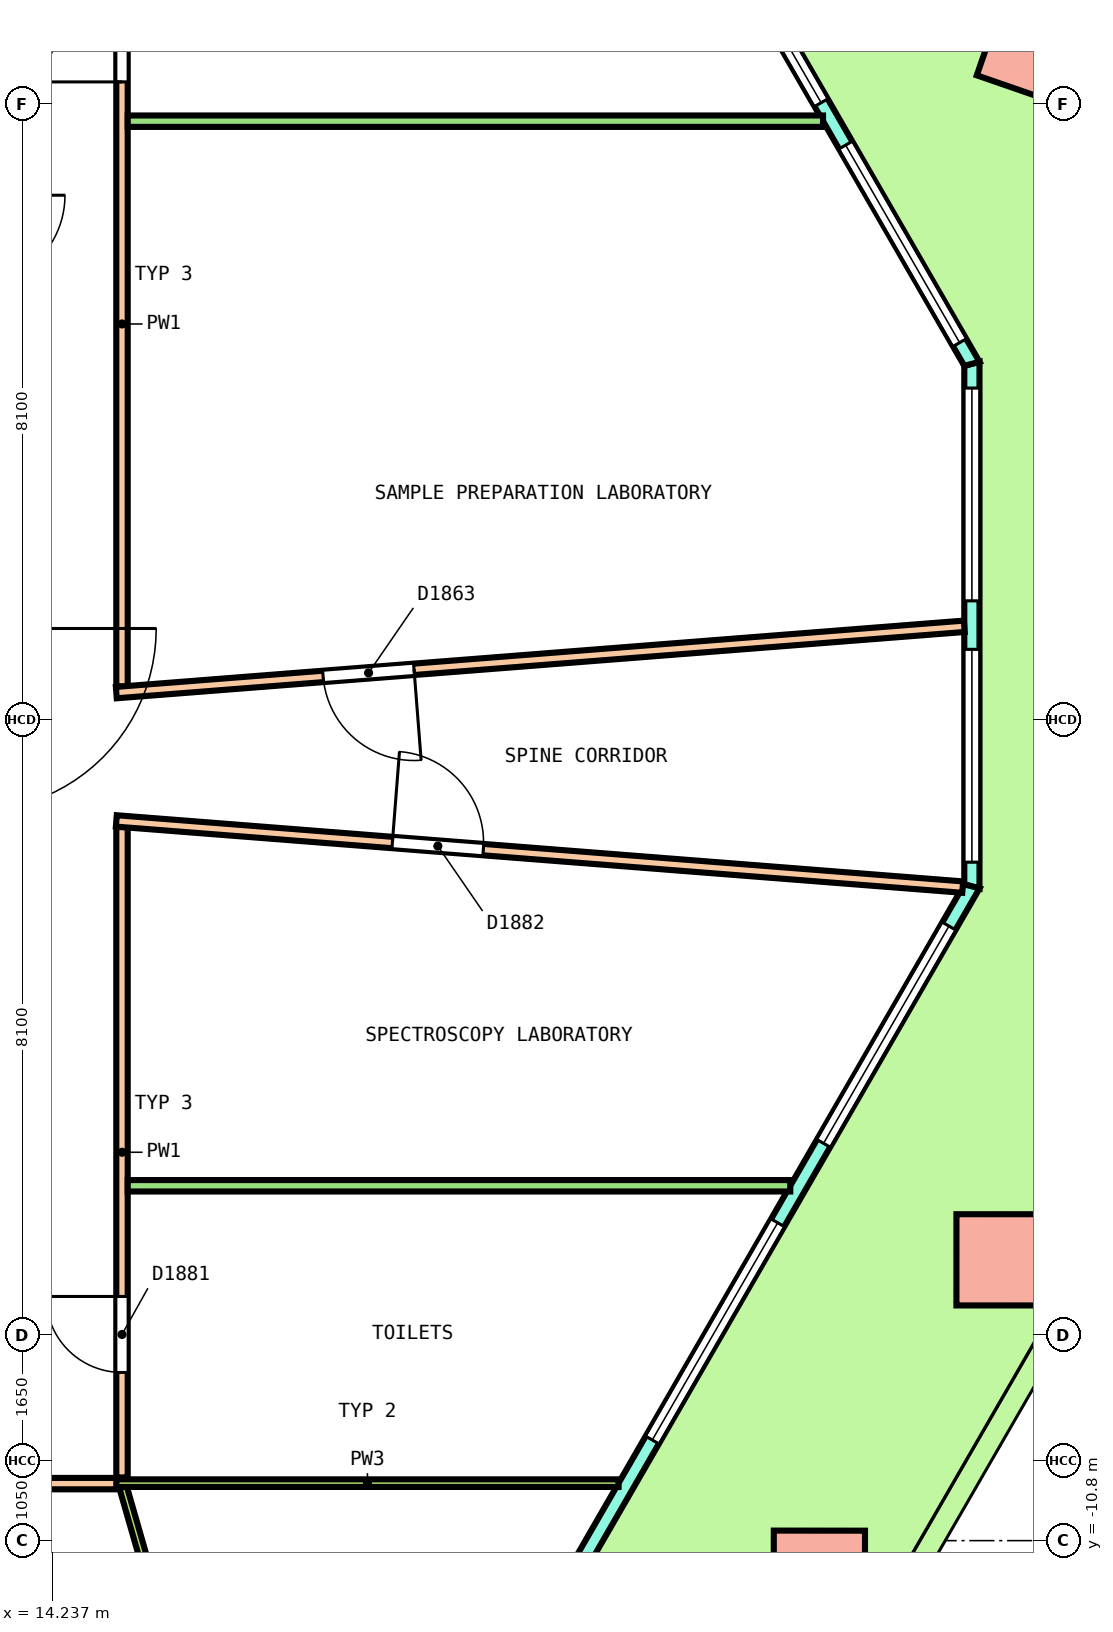
"""IFC4 building model, lengths in metres.
Left out: names, types, materials, properties, quantities, classifications, styles, units other than length and angle.
Written with IfcOpenShell. Run it as: python <this file> out.ifc"""

import sys

from ifc_helpers import new_model, si_unit, direction, frame, frame_2d, origin, origin_2d, place, context, subcontext, project, spatial, polyline, rectangle, outline, extrude, element, fill, save


model = new_model("IFC4")
c1 = context("Model", 3, precision=1e-05, world=origin(), true_north=direction((0.0, 1.0)))
c2 = subcontext(c1, "Body", "Model", "MODEL_VIEW")
j1 = project(units=[si_unit("LENGTHUNIT", "METRE"), si_unit("PLANEANGLEUNIT", "RADIAN")], contexts=[c1])
p1 = place(None, origin())
s1 = spatial("IfcSite", under=j1, at=p1, CompositionType="ELEMENT")
p2 = place(p1, origin())
s2 = spatial("IfcBuilding", under=s1, at=p2, CompositionType="ELEMENT")
p3 = place(p2, frame((0.0, 0.0, 184.8)))
s3 = spatial("IfcBuildingStorey", under=s2, at=p3, CompositionType="ELEMENT", Elevation=184.8)
p4 = place(p3, frame((27.159, 8.848, 0.0), z_axis=(0.021809609218, 0.025123223878, 0.999446429063), x_axis=(-0.499316957517, 0.86635106376, -0.010881647777)))
e1 = element("IfcColumn", 1, at=p4, inside=s3, PredefinedType="COLUMN", context=c2, shape_type="SweptSolid", body=[
    extrude(rectangle(XDim=1.2, YDim=1.2, at=origin_2d()), origin(), (0.0, 0.0, 1.0), 4.052),
])
p5 = place(p3, frame((24.325, -11.269, 0.0), z_axis=(0.003556481251, 0.006269051696, 0.999974024879), x_axis=(0.494245814029, 0.869292313203, -0.00720760164)))
e2 = element("IfcColumn", 2, at=p5, inside=s3, PredefinedType="COLUMN", context=c2, shape_type="SweptSolid", body=[
    extrude(rectangle(XDim=1.2, YDim=1.2, at=origin_2d()), origin(), (0.0, 0.0, 1.0), 4.05),
])
p6 = place(p3, frame((26.728, -7.106, 0.0), z_axis=(0.010908253887, 0.018863444567, 0.99976256204), x_axis=(0.500638377412, 0.865382225109, -0.021790354016)))
e3 = element("IfcColumn", 3, at=p6, inside=s3, PredefinedType="COLUMN", context=c2, shape_type="SweptSolid", body=[
    extrude(rectangle(XDim=1.2, YDim=1.2, at=origin_2d()), origin(), (0.0, 0.0, 1.0), 4.051),
])
p7 = place(p3, frame((26.331, -2.193, 0.0), z_axis=(0.0, 0.0, 1.0), x_axis=(0.0, 1.0, 0.0)))
e4 = element("IfcWall", 4, at=p7, inside=s3, PredefinedType="SOLIDWALL", context=c2, shape_type="SweptSolid", body=[
    extrude(outline(polyline([(-0.027, -0.1), (1.128, -0.1), (2.283, -0.1), (3.438, -0.1), (4.592, -0.1), (5.747, -0.1), (6.902, -0.1), (6.848, 0.1), (5.711, 0.1), (4.574, 0.1), (3.438, 0.1), (2.301, 0.1), (1.164, 0.1), (0.027, 0.1), (-0.027, -0.1)])), origin(), (0.0, 0.0, 1.0), 4.1),
])
p8 = place(p7, frame((0.319, 0.0, 0.1)))
e5 = element("IfcOpeningElement", 5, at=p8, cuts=e4, PredefinedType="OPENING", context=c2, shape_type="SweptSolid", body=[
    extrude(rectangle(XDim=2.8, YDim=2.9, at=frame_2d((1.4, 1.45))), frame((0.0, 0.11, 0.0), z_axis=(0.0, -1.0, 0.0), x_axis=(1.0, 0.0, 0.0)), (0.0, 0.0, 1.0), 0.22),
])
p9 = place(p7, frame((3.756, 0.0, 0.1)))
e6 = element("IfcOpeningElement", 6, at=p9, cuts=e4, PredefinedType="OPENING", context=c2, shape_type="SweptSolid", body=[
    extrude(rectangle(XDim=2.8, YDim=2.9, at=frame_2d((1.4, 1.45))), frame((0.0, 0.11, 0.0), z_axis=(0.0, -1.0, 0.0), x_axis=(1.0, 0.0, 0.0)), (0.0, 0.0, 1.0), 0.22),
])
p10 = place(p3, frame((26.331, 4.682, 0.0), z_axis=(0.0, 0.0, 1.0), x_axis=(-0.500002344326, 0.866024050283, 0.0)))
e7 = element("IfcWall", 7, at=p10, inside=s3, PredefinedType="SOLIDWALL", context=c2, shape_type="SweptSolid", body=[
    extrude(outline(polyline([(-0.027, -0.1), (0.989, -0.1), (2.004, -0.1), (3.019, -0.1), (4.034, -0.1), (5.05, -0.1), (6.065, -0.1), (7.08, -0.1), (8.096, -0.1), (9.111, -0.1), (10.126, -0.1), (11.142, -0.1), (12.157, -0.1), (13.172, -0.1), (14.188, -0.1), (15.203, -0.1), (16.218, -0.1), (17.234, -0.1), (18.249, -0.1), (18.195, 0.1), (17.186, 0.1), (16.177, 0.1), (15.167, 0.1), (14.158, 0.1), (13.148, 0.1), (12.139, 0.1), (11.13, 0.1), (10.12, 0.1), (9.111, 0.1), (8.102, 0.1), (7.092, 0.1), (6.083, 0.1), (5.074, 0.1), (4.064, 0.1), (3.055, 0.1), (2.046, 0.1), (1.036, 0.1), (0.027, 0.1), (-0.027, -0.1)])), origin(), (0.0, 0.0, 1.0), 4.1),
])
p11 = place(p10, frame((0.322, 0.0, 0.1)))
e8 = element("IfcOpeningElement", 8, at=p11, cuts=e7, PredefinedType="OPENING", context=c2, shape_type="SweptSolid", body=[
    extrude(rectangle(XDim=3.0, YDim=2.9, at=frame_2d((1.5, 1.45))), frame((0.0, 0.11, 0.0), z_axis=(0.0, -1.0, 0.0), x_axis=(1.0, 0.0, 0.0)), (0.0, 0.0, 1.0), 0.22),
])
p12 = place(p10, frame((3.967, 0.0, 0.1)))
e9 = element("IfcOpeningElement", 9, at=p12, cuts=e7, PredefinedType="OPENING", context=c2, shape_type="SweptSolid", body=[
    extrude(rectangle(XDim=3.0, YDim=2.9, at=frame_2d((1.5, 1.45))), frame((0.0, 0.11, 0.0), z_axis=(0.0, -1.0, 0.0), x_axis=(1.0, 0.0, 0.0)), (0.0, 0.0, 1.0), 0.22),
])
p13 = place(p10, frame((8.211, 0.0, 0.0)))
e10 = element("IfcOpeningElement", 10, at=p13, cuts=e7, PredefinedType="OPENING", context=c2, shape_type="SweptSolid", body=[
    extrude(rectangle(XDim=1.8, YDim=2.4, at=frame_2d((0.9, 1.2))), frame((0.0, 0.11, 0.0), z_axis=(0.0, -1.0, 0.0), x_axis=(1.0, 0.0, 0.0)), (0.0, 0.0, 1.0), 0.22),
])
p14 = place(p10, frame((8.211, 0.0, 2.55)))
e11 = element("IfcOpeningElement", 11, at=p14, cuts=e7, PredefinedType="OPENING", context=c2, shape_type="SweptSolid", body=[
    extrude(rectangle(XDim=1.8, YDim=0.45, at=frame_2d((0.9, 0.225))), frame((0.0, 0.11, 0.0), z_axis=(0.0, -1.0, 0.0), x_axis=(1.0, 0.0, 0.0)), (0.0, 0.0, 1.0), 0.22),
])
p15 = place(p10, frame((11.256, 0.0, 0.1)))
e12 = element("IfcOpeningElement", 12, at=p15, cuts=e7, PredefinedType="OPENING", context=c2, shape_type="SweptSolid", body=[
    extrude(rectangle(XDim=3.0, YDim=2.9, at=frame_2d((1.5, 1.45))), frame((0.0, 0.11, 0.0), z_axis=(0.0, -1.0, 0.0), x_axis=(1.0, 0.0, 0.0)), (0.0, 0.0, 1.0), 0.22),
])
p16 = place(p10, frame((14.9, 0.0, 0.1)))
e13 = element("IfcOpeningElement", 13, at=p16, cuts=e7, PredefinedType="OPENING", context=c2, shape_type="SweptSolid", body=[
    extrude(rectangle(XDim=3.0, YDim=2.9, at=frame_2d((1.5, 1.45))), frame((0.0, 0.11, 0.0), z_axis=(0.0, -1.0, 0.0), x_axis=(1.0, 0.0, 0.0)), (0.0, 0.0, 1.0), 0.22),
])
p17 = place(p3, frame((15.065, -21.707, 0.0), z_axis=(0.0, 0.0, 1.0), x_axis=(0.499998501835, 0.866026268748, 0.0)))
e14 = element("IfcWall", 14, at=p17, inside=s3, PredefinedType="SOLIDWALL", context=c2, shape_type="SweptSolid", body=[
    extrude(outline(polyline([(-0.027, -0.1), (1.0, -0.1), (2.027, -0.1), (3.053, -0.1), (4.08, -0.1), (5.106, -0.1), (6.133, -0.1), (7.16, -0.1), (8.187, -0.1), (9.213, -0.1), (10.24, -0.1), (11.267, -0.1), (12.293, -0.1), (13.32, -0.1), (14.347, -0.1), (15.373, -0.1), (16.4, -0.1), (17.427, -0.1), (18.453, -0.1), (19.48, -0.1), (20.507, -0.1), (21.533, -0.1), (22.56, -0.1), (22.506, 0.1), (21.485, 0.1), (20.463, 0.1), (19.441, 0.1), (18.419, 0.1), (17.397, 0.1), (16.375, 0.1), (15.354, 0.1), (14.332, 0.1), (13.31, 0.1), (12.288, 0.1), (11.267, 0.1), (10.245, 0.1), (9.223, 0.1), (8.201, 0.1), (7.179, 0.1), (6.158, 0.1), (5.136, 0.1), (4.114, 0.1), (3.092, 0.1), (2.071, 0.1), (1.049, 0.1), (0.027, 0.1), (-0.027, -0.1)])), origin(), (0.0, 0.0, 1.0), 4.1),
])
p18 = place(p17, frame((0.603, 0.0, 0.1)))
e15 = element("IfcOpeningElement", 15, at=p18, cuts=e14, PredefinedType="OPENING", context=c2, shape_type="SweptSolid", body=[
    extrude(rectangle(XDim=3.3, YDim=2.9, at=frame_2d((1.65, 1.45))), frame((0.0, 0.11, 0.0), z_axis=(0.0, -1.0, 0.0), x_axis=(1.0, 0.0, 0.0)), (0.0, 0.0, 1.0), 0.22),
])
p19 = place(p17, frame((5.11, 0.0, 0.1)))
e16 = element("IfcOpeningElement", 16, at=p19, cuts=e14, PredefinedType="OPENING", context=c2, shape_type="SweptSolid", body=[
    extrude(rectangle(XDim=3.3, YDim=2.9, at=frame_2d((1.65, 1.45))), frame((0.0, 0.11, 0.0), z_axis=(0.0, -1.0, 0.0), x_axis=(1.0, 0.0, 0.0)), (0.0, 0.0, 1.0), 0.22),
])
p20 = place(p17, frame((10.367, 0.0, 0.0)))
e17 = element("IfcOpeningElement", 17, at=p20, cuts=e14, PredefinedType="OPENING", context=c2, shape_type="SweptSolid", body=[
    extrude(rectangle(XDim=1.8, YDim=2.4, at=frame_2d((0.9, 1.2))), frame((0.0, 0.11, 0.0), z_axis=(0.0, -1.0, 0.0), x_axis=(1.0, 0.0, 0.0)), (0.0, 0.0, 1.0), 0.22),
])
p21 = place(p17, frame((10.367, 0.0, 2.55)))
e18 = element("IfcOpeningElement", 18, at=p21, cuts=e14, PredefinedType="OPENING", context=c2, shape_type="SweptSolid", body=[
    extrude(rectangle(XDim=1.8, YDim=0.45, at=frame_2d((0.9, 0.225))), frame((0.0, 0.11, 0.0), z_axis=(0.0, -1.0, 0.0), x_axis=(1.0, 0.0, 0.0)), (0.0, 0.0, 1.0), 0.22),
])
p22 = place(p17, frame((14.123, 0.0, 0.1)))
e19 = element("IfcOpeningElement", 19, at=p22, cuts=e14, PredefinedType="OPENING", context=c2, shape_type="SweptSolid", body=[
    extrude(rectangle(XDim=3.3, YDim=2.9, at=frame_2d((1.65, 1.45))), frame((0.0, 0.11, 0.0), z_axis=(0.0, -1.0, 0.0), x_axis=(1.0, 0.0, 0.0)), (0.0, 0.0, 1.0), 0.22),
])
p23 = place(p17, frame((18.63, 0.0, 0.1)))
e20 = element("IfcOpeningElement", 20, at=p23, cuts=e14, PredefinedType="OPENING", context=c2, shape_type="SweptSolid", body=[
    extrude(rectangle(XDim=3.3, YDim=2.9, at=frame_2d((1.65, 1.45))), frame((0.0, 0.11, 0.0), z_axis=(0.0, -1.0, 0.0), x_axis=(1.0, 0.0, 0.0)), (0.0, 0.0, 1.0), 0.22),
])
p24 = place(p3, frame((15.15, -9.969, 0.0), z_axis=(0.0, 0.0, 1.0), x_axis=(0.0, 1.0, 0.0)))
e21 = element("IfcWall", 21, at=p24, inside=s3, PredefinedType="PARTITIONING", context=c2, shape_type="SweptSolid", body=[
    extrude(rectangle(XDim=8.556, YDim=0.15, at=frame_2d((4.278, 0.0))), origin(), (0.0, 0.0, 1.0), 3.05),
])
p25 = place(p24, frame((1.381, 0.0, 0.0)))
e22 = element("IfcOpeningElement", 22, at=p25, cuts=e21, PredefinedType="OPENING", context=c2, shape_type="SweptSolid", body=[
    extrude(rectangle(XDim=1.0, YDim=2.1, at=frame_2d((0.5, 1.05))), frame((0.0, 0.085, 0.0), z_axis=(0.0, -1.0, 0.0), x_axis=(1.0, 0.0, 0.0)), (0.0, 0.0, 1.0), 0.17),
])
p26 = place(p3, frame((15.15, 0.438, 0.0), z_axis=(0.0, 0.0, 1.0), x_axis=(0.0, 1.0, 0.0)))
e23 = element("IfcWall", 23, at=p26, inside=s3, PredefinedType="PARTITIONING", context=c2, shape_type="SweptSolid", body=[
    extrude(rectangle(XDim=9.538, YDim=0.15, at=frame_2d((4.769, 0.0))), origin(), (0.0, 0.0, 1.0), 3.05),
])
p27 = place(p26, frame((7.953, 0.0, 0.0)))
e24 = element("IfcOpeningElement", 24, at=p27, cuts=e23, PredefinedType="OPENING", context=c2, shape_type="SweptSolid", body=[
    extrude(rectangle(XDim=1.0, YDim=2.1, at=frame_2d((0.5, 1.05))), frame((0.0, 0.085, 0.0), z_axis=(0.0, -1.0, 0.0), x_axis=(1.0, 0.0, 0.0)), (0.0, 0.0, 1.0), 0.17),
])
p28 = place(p3, frame((-15.063, -10.05, 0.0), z_axis=(0.0, 0.0, 1.0), x_axis=(1.0, 0.0, 0.0)))
e25 = element("IfcWall", 25, at=p28, inside=s3, PredefinedType="PARTITIONING", context=c2, shape_type="SweptSolid", body=[
    extrude(rectangle(XDim=30.163, YDim=0.15, at=frame_2d((15.082, 0.0))), origin(), (0.0, 0.0, 1.0), 3.05),
])
p29 = place(p28, frame((3.5, 0.0, 0.0)))
e26 = element("IfcOpeningElement", 26, at=p29, cuts=e25, PredefinedType="OPENING", context=c2, shape_type="SweptSolid", body=[
    extrude(rectangle(XDim=1.0, YDim=2.1, at=frame_2d((0.5, 1.05))), frame((0.0, 0.085, 0.0), z_axis=(0.0, -1.0, 0.0), x_axis=(1.0, 0.0, 0.0)), (0.0, 0.0, 1.0), 0.17),
])
p30 = place(p28, frame((12.007, 0.0, 0.0)))
e27 = element("IfcOpeningElement", 27, at=p30, cuts=e25, PredefinedType="OPENING", context=c2, shape_type="SweptSolid", body=[
    extrude(rectangle(XDim=1.2, YDim=2.1, at=frame_2d((0.6, 1.05))), frame((0.0, 0.085, 0.0), z_axis=(0.0, -1.0, 0.0), x_axis=(1.0, 0.0, 0.0)), (0.0, 0.0, 1.0), 0.17),
])
p31 = place(p28, frame((26.707, 0.0, 0.0)))
e28 = element("IfcOpeningElement", 28, at=p31, cuts=e25, PredefinedType="OPENING", context=c2, shape_type="SweptSolid", body=[
    extrude(rectangle(XDim=1.0, YDim=2.1, at=frame_2d((0.5, 1.05))), frame((0.0, 0.085, 0.0), z_axis=(0.0, -1.0, 0.0), x_axis=(1.0, 0.0, 0.0)), (0.0, 0.0, 1.0), 0.17),
])
p32 = place(p3, frame((15.075, 0.357, 0.0), z_axis=(0.0, 0.0, 1.0), x_axis=(0.996958619643, 0.077932732014, 0.0)))
e29 = element("IfcWall", 29, at=p32, inside=s3, PredefinedType="PARTITIONING", context=c2, shape_type="SweptSolid", body=[
    extrude(rectangle(XDim=11.19, YDim=0.15, at=frame_2d((5.595, 0.0))), origin(), (0.0, 0.0, 1.0), 3.05),
])
p33 = place(p32, frame((2.729, 0.0, 0.0)))
e30 = element("IfcOpeningElement", 30, at=p33, cuts=e29, PredefinedType="OPENING", context=c2, shape_type="SweptSolid", body=[
    extrude(rectangle(XDim=1.2, YDim=2.1, at=frame_2d((0.6, 1.05))), frame((0.0, 0.085, 0.0), z_axis=(0.0, -1.0, 0.0), x_axis=(1.0, 0.0, 0.0)), (0.0, 0.0, 1.0), 0.17),
])
p34 = place(p3, frame((15.075, -1.332, 0.0), z_axis=(0.0, 0.0, 1.0), x_axis=(0.9969573922, -0.077948432559, 0.0)))
e31 = element("IfcWall", 31, at=p34, inside=s3, PredefinedType="PARTITIONING", context=c2, shape_type="SweptSolid", body=[
    extrude(rectangle(XDim=11.169, YDim=0.15, at=frame_2d((5.584, 0.0))), origin(), (0.0, 0.0, 1.0), 3.05),
])
p35 = place(p34, frame((3.643, 0.0, 0.0)))
e32 = element("IfcOpeningElement", 32, at=p35, cuts=e31, PredefinedType="OPENING", context=c2, shape_type="SweptSolid", body=[
    extrude(rectangle(XDim=1.2, YDim=2.1, at=frame_2d((0.6, 1.05))), frame((0.0, 0.085, 0.0), z_axis=(0.0, -1.0, 0.0), x_axis=(1.0, 0.0, 0.0)), (0.0, 0.0, 1.0), 0.17),
])
p36 = place(p3, frame((15.225, 7.874, 0.0), z_axis=(0.0, 0.0, 1.0), x_axis=(1.0, 0.0, 0.0)))
e33 = element("IfcWall", 33, at=p36, inside=s3, PredefinedType="PARTITIONING", context=c2, shape_type="SweptSolid", body=[
    extrude(rectangle(XDim=9.148, YDim=0.15, at=frame_2d((4.574, 0.0))), origin(), (0.0, 0.0, 1.0), 3.05),
])
p37 = place(p3, frame((15.225, -6.132, 0.0), z_axis=(0.0, 0.0, 1.0), x_axis=(1.0, 0.0, 0.0)))
e34 = element("IfcWall", 34, at=p37, inside=s3, PredefinedType="PARTITIONING", context=c2, shape_type="SweptSolid", body=[
    extrude(rectangle(XDim=8.717, YDim=0.15, at=frame_2d((4.358, 0.0))), origin(), (0.0, 0.0, 1.0), 3.05),
])
p38 = place(p3, frame((15.164, -10.098, 0.0), z_axis=(0.0, 0.0, 1.0), x_axis=(0.276168961066, -0.961109101478, 0.0)))
e35 = element("IfcWall", 35, at=p38, inside=s3, PredefinedType="PARTITIONING", context=c2, shape_type="SweptSolid", body=[
    extrude(rectangle(XDim=3.563, YDim=0.1, at=frame_2d((1.781, 0.0))), origin(), (0.0, 0.0, 1.0), 3.05),
])
p39 = place(p38, frame((1.678, 0.0, 0.0)))
e36 = element("IfcOpeningElement", 36, at=p39, cuts=e35, PredefinedType="OPENING", context=c2, shape_type="SweptSolid", body=[
    extrude(rectangle(XDim=1.0, YDim=2.1, at=frame_2d((0.5, 1.05))), frame((0.0, 0.06, 0.0), z_axis=(0.0, -1.0, 0.0), x_axis=(1.0, 0.0, 0.0)), (0.0, 0.0, 1.0), 0.12),
])
p40 = place(p3, frame((15.075, -10.044, 0.0), z_axis=(0.0, 0.0, 1.0), x_axis=(1.0, 0.0, 0.0)))
e37 = element("IfcWall", 37, at=p40, inside=s3, PredefinedType="PARTITIONING", context=c2, shape_type="SweptSolid", body=[
    extrude(rectangle(XDim=6.608, YDim=0.1, at=frame_2d((3.304, 0.0))), origin(), (0.0, 0.0, 1.0), 3.05),
])
p41 = place(p8, origin())
e38 = element("IfcWindow", 38, at=p41, inside=s3, PartitioningType="SINGLE_PANEL", PredefinedType="WINDOW", context=c2, shape_type="SweptSolid", body=[
    extrude(rectangle(XDim=2.8, YDim=2.9, at=frame_2d((1.4, 1.45))), frame((0.0, 0.03, 0.0), z_axis=(0.0, -1.0, 0.0), x_axis=(1.0, 0.0, 0.0)), (0.0, 0.0, 1.0), 0.06),
])
fill(e5, e38)
p42 = place(p9, origin())
e39 = element("IfcWindow", 39, at=p42, inside=s3, PartitioningType="SINGLE_PANEL", PredefinedType="WINDOW", context=c2, shape_type="SweptSolid", body=[
    extrude(rectangle(XDim=2.8, YDim=2.9, at=frame_2d((1.4, 1.45))), frame((0.0, 0.03, 0.0), z_axis=(0.0, -1.0, 0.0), x_axis=(1.0, 0.0, 0.0)), (0.0, 0.0, 1.0), 0.06),
])
fill(e6, e39)
p43 = place(p11, origin())
e40 = element("IfcWindow", 40, at=p43, inside=s3, PartitioningType="SINGLE_PANEL", PredefinedType="WINDOW", context=c2, shape_type="SweptSolid", body=[
    extrude(rectangle(XDim=3.0, YDim=2.9, at=frame_2d((1.5, 1.45))), frame((0.0, 0.03, 0.0), z_axis=(0.0, -1.0, 0.0), x_axis=(1.0, 0.0, 0.0)), (0.0, 0.0, 1.0), 0.06),
])
fill(e8, e40)
p44 = place(p12, origin())
e41 = element("IfcWindow", 41, at=p44, inside=s3, PartitioningType="SINGLE_PANEL", PredefinedType="WINDOW", context=c2, shape_type="SweptSolid", body=[
    extrude(rectangle(XDim=3.0, YDim=2.9, at=frame_2d((1.5, 1.45))), frame((0.0, 0.03, 0.0), z_axis=(0.0, -1.0, 0.0), x_axis=(1.0, 0.0, 0.0)), (0.0, 0.0, 1.0), 0.06),
])
fill(e9, e41)
p45 = place(p22, origin())
e42 = element("IfcWindow", 42, at=p45, inside=s3, PartitioningType="SINGLE_PANEL", PredefinedType="WINDOW", context=c2, shape_type="SweptSolid", body=[
    extrude(rectangle(XDim=3.3, YDim=2.9, at=frame_2d((1.65, 1.45))), frame((0.0, 0.03, 0.0), z_axis=(0.0, -1.0, 0.0), x_axis=(1.0, 0.0, 0.0)), (0.0, 0.0, 1.0), 0.06),
])
fill(e19, e42)
p46 = place(p23, origin())
e43 = element("IfcWindow", 43, at=p46, inside=s3, PartitioningType="SINGLE_PANEL", PredefinedType="WINDOW", context=c2, shape_type="SweptSolid", body=[
    extrude(rectangle(XDim=3.3, YDim=2.9, at=frame_2d((1.65, 1.45))), frame((0.0, 0.03, 0.0), z_axis=(0.0, -1.0, 0.0), x_axis=(1.0, 0.0, 0.0)), (0.0, 0.0, 1.0), 0.06),
])
fill(e20, e43)
p47 = place(p33, origin())
e44 = element("IfcDoor", 44, at=p47, inside=s3, OperationType="DOUBLE_DOOR_SINGLE_SWING", PredefinedType="DOOR", context=c2, shape_type="SweptSolid", body=[
    extrude(rectangle(XDim=1.2, YDim=2.1, at=frame_2d((0.6, 1.05))), frame((0.0, 0.025, 0.0), z_axis=(0.0, -1.0, 0.0), x_axis=(1.0, 0.0, 0.0)), (0.0, 0.0, 1.0), 0.05),
])
fill(e30, e44)
p48 = place(p27, origin())
e45 = element("IfcDoor", 45, at=p48, inside=s3, OperationType="SINGLE_SWING_RIGHT", PredefinedType="DOOR", context=c2, shape_type="SweptSolid", body=[
    extrude(rectangle(XDim=1.0, YDim=2.1, at=frame_2d((0.5, 1.05))), frame((0.0, 0.025, 0.0), z_axis=(0.0, -1.0, 0.0), x_axis=(1.0, 0.0, 0.0)), (0.0, 0.0, 1.0), 0.05),
])
fill(e24, e45)
p49 = place(p25, origin())
e46 = element("IfcDoor", 46, at=p49, inside=s3, OperationType="SINGLE_SWING_RIGHT", PredefinedType="DOOR", context=c2, shape_type="SweptSolid", body=[
    extrude(rectangle(XDim=1.0, YDim=2.1, at=frame_2d((0.5, 1.05))), frame((0.0, 0.025, 0.0), z_axis=(0.0, -1.0, 0.0), x_axis=(1.0, 0.0, 0.0)), (0.0, 0.0, 1.0), 0.05),
])
fill(e22, e46)
p50 = place(p35, origin())
e47 = element("IfcDoor", 47, at=p50, inside=s3, OperationType="DOUBLE_DOOR_SINGLE_SWING", PredefinedType="DOOR", context=c2, shape_type="SweptSolid", body=[
    extrude(rectangle(XDim=1.2, YDim=2.1, at=frame_2d((0.6, 1.05))), frame((0.0, 0.025, 0.0), z_axis=(0.0, -1.0, 0.0), x_axis=(1.0, 0.0, 0.0)), (0.0, 0.0, 1.0), 0.05),
])
fill(e32, e47)
save(model, sys.argv[1])
